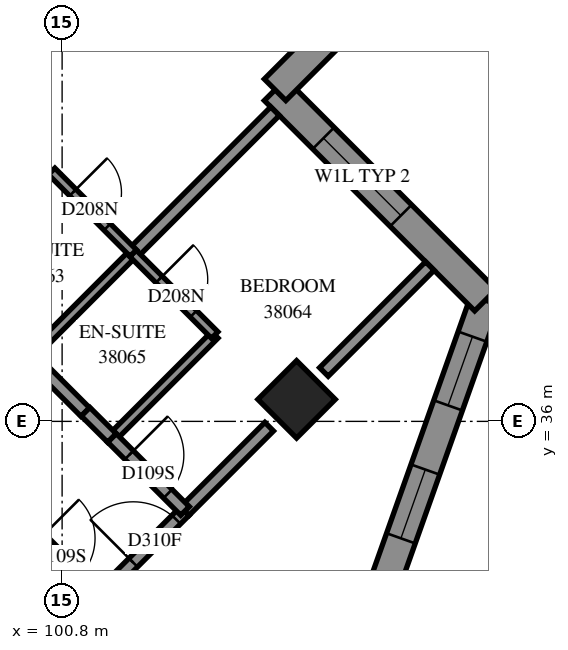
"""IFC4 building model, lengths in metres.
Left out: names, types, materials, properties, quantities, classifications, styles, units other than length and angle.
Written with IfcOpenShell. Run it as: python <this file> out.ifc"""

import sys

from ifc_helpers import new_model, si_unit, direction, frame, frame_2d, origin, origin_2d, place, context, subcontext, project, spatial, polyline, rectangle, outline, extrude, element, fill, save


model = new_model("IFC4")
c1 = context("Model", 3, precision=1e-05, world=origin(), true_north=direction((0.0, 1.0)))
c2 = subcontext(c1, "Body", "Model", "MODEL_VIEW")
j1 = project(units=[si_unit("LENGTHUNIT", "METRE"), si_unit("PLANEANGLEUNIT", "RADIAN")], contexts=[c1])
p1 = place(None, origin())
s1 = spatial("IfcSite", under=j1, at=p1, CompositionType="ELEMENT")
p2 = place(p1, origin())
s2 = spatial("IfcBuilding", under=s1, at=p2, CompositionType="ELEMENT")
p3 = place(p2, frame((0.0, 0.0, 142.2)))
s3 = spatial("IfcBuildingStorey", under=s2, at=p3, CompositionType="ELEMENT", Elevation=142.2)
p4 = place(p3, frame((104.656, 36.362, 0.0), z_axis=(0.0, 0.0, 1.0), x_axis=(0.7071067812, -0.7071067812, 0.0)))
e1 = element("IfcColumn", 1, at=p4, inside=s3, PredefinedType="COLUMN", context=c2, shape_type="SweptSolid", body=[
    extrude(rectangle(XDim=0.9, YDim=0.9, at=origin_2d()), origin(), (0.0, 0.0, 1.0), 3.1),
])
p5 = place(p3, frame((105.986, 32.989, 0.0), z_axis=(0.0, 0.0, 1.0), x_axis=(0.3344271092, 0.9424216194, 0.0)))
e2 = element("IfcWall", 2, at=p5, inside=s3, PredefinedType="SOLIDWALL", context=c2, shape_type="SweptSolid", body=[
    extrude(outline(polyline([(-0.114, -0.25), (5.468, -0.25), (5.153, 0.25), (0.114, 0.25), (-0.114, -0.25)])), origin(), (0.0, 0.0, 1.0), 3.1),
])
p6 = place(p5, frame((1.155, 0.0, 0.45)))
e3 = element("IfcOpeningElement", 3, at=p6, cuts=e2, PredefinedType="OPENING", context=c2, shape_type="SweptSolid", body=[
    extrude(rectangle(XDim=1.2, YDim=2.5, at=frame_2d((0.6, 1.25))), frame((0.0, 0.26, 0.0), z_axis=(0.0, -1.0, 0.0), x_axis=(1.0, 0.0, 0.0)), (0.0, 0.0, 1.0), 0.52),
])
p7 = place(p5, frame((3.474, 0.0, 0.45)))
e4 = element("IfcOpeningElement", 4, at=p7, cuts=e2, PredefinedType="OPENING", context=c2, shape_type="SweptSolid", body=[
    extrude(rectangle(XDim=1.2, YDim=2.5, at=frame_2d((0.6, 1.25))), frame((0.0, 0.26, 0.0), z_axis=(0.0, -1.0, 0.0), x_axis=(1.0, 0.0, 0.0)), (0.0, 0.0, 1.0), 0.52),
])
p8 = place(p3, frame((107.762, 37.994, 0.0), z_axis=(0.0, 0.0, 1.0), x_axis=(-0.7071170013, 0.7070965609, 0.0)))
e5 = element("IfcWall", 5, at=p8, inside=s3, PredefinedType="SOLIDWALL", context=c2, shape_type="SweptSolid", body=[
    extrude(outline(polyline([(-0.158, -0.25), (4.642, -0.25), (5.142, 0.25), (0.158, 0.25), (-0.158, -0.25)])), origin(), (0.0, 0.0, 1.0), 3.1),
])
p9 = place(p8, frame((1.967, 0.0, 0.6)))
e6 = element("IfcOpeningElement", 6, at=p9, cuts=e5, PredefinedType="OPENING", context=c2, shape_type="SweptSolid", body=[
    extrude(rectangle(XDim=1.8, YDim=1.9, at=frame_2d((0.9, 0.95))), frame((0.0, 0.26, 0.0), z_axis=(0.0, -1.0, 0.0), x_axis=(1.0, 0.0, 0.0)), (0.0, 0.0, 1.0), 0.52),
])
p10 = place(p3, frame((104.302, 41.453, 0.0), z_axis=(0.0, 0.0, 1.0), x_axis=(0.707115584, 0.7070979783, 0.0)))
e7 = element("IfcWall", 7, at=p10, inside=s3, PredefinedType="SOLIDWALL", context=c2, shape_type="SweptSolid", body=[
    extrude(outline(polyline([(0.25, -0.25), (6.011, -0.25), (5.349, 0.25), (-0.25, 0.25), (0.25, -0.25)])), origin(), (0.0, 0.0, 1.0), 3.1),
])
p11 = place(p10, frame((1.125, 0.0, 0.6)))
e8 = element("IfcOpeningElement", 8, at=p11, cuts=e7, PredefinedType="OPENING", context=c2, shape_type="SweptSolid", body=[
    extrude(rectangle(XDim=1.8, YDim=1.9, at=frame_2d((0.9, 0.95))), frame((0.0, 0.26, 0.0), z_axis=(0.0, -1.0, 0.0), x_axis=(1.0, 0.0, 0.0)), (0.0, 0.0, 1.0), 0.52),
])
p12 = place(p3, frame((95.177, 42.157, 0.0), z_axis=(0.0, 0.0, 1.0), x_axis=(0.7071067812, -0.7071067812, 0.0)))
e9 = element("IfcWall", 9, at=p12, inside=s3, PredefinedType="PARTITIONING", context=c2, shape_type="SweptSolid", body=[
    extrude(rectangle(XDim=8.491, YDim=0.2, at=frame_2d((4.245, 0.0))), origin(), (0.0, 0.0, 1.0), 3.1),
])
p13 = place(p12, frame((2.3, 0.0, 0.0)))
e10 = element("IfcOpeningElement", 10, at=p13, cuts=e9, PredefinedType="OPENING", context=c2, shape_type="SweptSolid", body=[
    extrude(rectangle(XDim=0.9, YDim=2.1, at=frame_2d((0.45, 1.05))), frame((0.0, 0.11, 0.0), z_axis=(0.0, -1.0, 0.0), x_axis=(1.0, 0.0, 0.0)), (0.0, 0.0, 1.0), 0.22),
])
p14 = place(p12, frame((3.95, 0.0, 0.0)))
e11 = element("IfcOpeningElement", 11, at=p14, cuts=e9, PredefinedType="OPENING", context=c2, shape_type="SweptSolid", body=[
    extrude(rectangle(XDim=0.9, YDim=2.1, at=frame_2d((0.45, 1.05))), frame((0.0, 0.11, 0.0), z_axis=(0.0, -1.0, 0.0), x_axis=(1.0, 0.0, 0.0)), (0.0, 0.0, 1.0), 0.22),
])
p15 = place(p3, frame((100.013, 41.903, 0.0), z_axis=(0.0, 0.0, 1.0), x_axis=(0.7071067812, 0.7071067812, 0.0)))
e12 = element("IfcWall", 12, at=p15, inside=s3, PredefinedType="PARTITIONING", context=c2, shape_type="SweptSolid", body=[
    extrude(rectangle(XDim=5.928, YDim=0.2, at=frame_2d((2.964, 0.0))), origin(), (0.0, 0.0, 1.0), 3.1),
])
p16 = place(p3, frame((101.968, 38.766, 0.0), z_axis=(0.0, 0.0, 1.0), x_axis=(0.7071067812, 0.7071067812, 0.0)))
e13 = element("IfcWall", 13, at=p16, inside=s3, PredefinedType="PARTITIONING", context=c2, shape_type="SweptSolid", body=[
    extrude(rectangle(XDim=3.3, YDim=0.2, at=frame_2d((1.65, 0.0))), origin(), (0.0, 0.0, 1.0), 3.1),
])
p17 = place(p3, frame((105.105, 36.813, 0.0), z_axis=(0.0, 0.0, 1.0), x_axis=(0.7071067812, 0.7071067812, 0.0)))
e14 = element("IfcWall", 14, at=p17, inside=s3, PredefinedType="PARTITIONING", context=c2, shape_type="SweptSolid", body=[
    extrude(rectangle(XDim=2.463, YDim=0.2, at=frame_2d((1.232, 0.0))), origin(), (0.0, 0.0, 1.0), 3.1),
])
p18 = place(p3, frame((98.927, 38.413, 0.0), z_axis=(0.0, 0.0, 1.0), x_axis=(0.7071067812, 0.7071067812, 0.0)))
e15 = element("IfcWall", 15, at=p18, inside=s3, PredefinedType="PARTITIONING", context=c2, shape_type="SweptSolid", body=[
    extrude(rectangle(XDim=2.401, YDim=0.15, at=frame_2d((1.201, 0.0))), origin(), (0.0, 0.0, 1.0), 3.1),
])
p19 = place(p3, frame((100.273, 37.067, 0.0), z_axis=(0.0, 0.0, 1.0), x_axis=(0.706689978, 0.7075233388, 0.0)))
e16 = element("IfcWall", 16, at=p19, inside=s3, PredefinedType="PARTITIONING", context=c2, shape_type="SweptSolid", body=[
    extrude(rectangle(XDim=2.4, YDim=0.15, at=frame_2d((1.2, 0.0))), origin(), (0.0, 0.0, 1.0), 3.1),
])
p20 = place(p3, frame((101.615, 35.727, 0.0), z_axis=(0.0, 0.0, 1.0), x_axis=(0.7071067812, 0.7071067812, 0.0)))
e17 = element("IfcWall", 17, at=p20, inside=s3, PredefinedType="PARTITIONING", context=c2, shape_type="SweptSolid", body=[
    extrude(rectangle(XDim=2.398, YDim=0.15, at=frame_2d((1.199, 0.0))), origin(), (0.0, 0.0, 1.0), 3.1),
])
p21 = place(p3, frame((101.403, 33.111, 0.0), z_axis=(0.0, 0.0, 1.0), x_axis=(0.7071067812, 0.7071067812, 0.0)))
e18 = element("IfcWall", 18, at=p21, inside=s3, PredefinedType="PARTITIONING", context=c2, shape_type="SweptSolid", body=[
    extrude(rectangle(XDim=2.0, YDim=0.2, at=frame_2d((1.0, 0.0))), origin(), (0.0, 0.0, 1.0), 2.6),
])
p22 = place(p21, frame((0.802, 0.0, 0.0)))
e19 = element("IfcOpeningElement", 19, at=p22, cuts=e18, PredefinedType="OPENING", context=c2, shape_type="SweptSolid", body=[
    extrude(rectangle(XDim=1.0, YDim=2.1, at=frame_2d((0.5, 1.05))), frame((0.0, 0.11, 0.0), z_axis=(0.0, -1.0, 0.0), x_axis=(1.0, 0.0, 0.0)), (0.0, 0.0, 1.0), 0.22),
])
p23 = place(p3, frame((102.817, 34.525, 0.0), z_axis=(0.0, 0.0, 1.0), x_axis=(0.7071067812, 0.7071067812, 0.0)))
e20 = element("IfcWall", 20, at=p23, inside=s3, PredefinedType="PARTITIONING", context=c2, shape_type="SweptSolid", body=[
    extrude(rectangle(XDim=1.963, YDim=0.2, at=frame_2d((0.982, 0.0))), origin(), (0.0, 0.0, 1.0), 2.6),
])
p24 = place(p3, frame((101.965, 38.763, 0.0), z_axis=(0.0, 0.0, 1.0), x_axis=(0.7071067812, -0.7071067812, 0.0)))
e21 = element("IfcWall", 21, at=p24, inside=s3, PredefinedType="PARTITIONING", context=c2, shape_type="SweptSolid", body=[
    extrude(rectangle(XDim=1.901, YDim=0.15, at=frame_2d((0.95, 0.0))), origin(), (0.0, 0.0, 1.0), 3.1),
])
p25 = place(p24, frame((0.608, 0.0, 0.0)))
e22 = element("IfcOpeningElement", 22, at=p25, cuts=e21, PredefinedType="OPENING", context=c2, shape_type="SweptSolid", body=[
    extrude(rectangle(XDim=0.8, YDim=2.1, at=frame_2d((0.4, 1.05))), frame((0.0, 0.085, 0.0), z_axis=(0.0, -1.0, 0.0), x_axis=(1.0, 0.0, 0.0)), (0.0, 0.0, 1.0), 0.17),
])
p26 = place(p3, frame((100.628, 40.112, 0.0), z_axis=(0.0, 0.0, 1.0), x_axis=(0.7065800724, -0.7076330979, 0.0)))
e23 = element("IfcWall", 23, at=p26, inside=s3, PredefinedType="PARTITIONING", context=c2, shape_type="SweptSolid", body=[
    extrude(rectangle(XDim=1.899, YDim=0.15, at=frame_2d((0.95, 0.0))), origin(), (0.0, 0.0, 1.0), 3.1),
])
p27 = place(p26, frame((0.493, 0.0, 0.0)))
e24 = element("IfcOpeningElement", 24, at=p27, cuts=e23, PredefinedType="OPENING", context=c2, shape_type="SweptSolid", body=[
    extrude(rectangle(XDim=0.8, YDim=2.1, at=frame_2d((0.4, 1.05))), frame((0.0, 0.085, 0.0), z_axis=(0.0, -1.0, 0.0), x_axis=(1.0, 0.0, 0.0)), (0.0, 0.0, 1.0), 0.17),
])
p28 = place(p3, frame((100.205, 34.315, 0.0), z_axis=(0.0, 0.0, 1.0), x_axis=(0.7071067812, -0.7071067812, 0.0)))
e25 = element("IfcWall", 25, at=p28, inside=s3, PredefinedType="PARTITIONING", context=c2, shape_type="SweptSolid", body=[
    extrude(rectangle(XDim=1.7, YDim=0.2, at=frame_2d((0.85, 0.0))), origin(), (0.0, 0.0, 1.0), 3.1),
])
p29 = place(p28, frame((0.335, 0.0, 0.0)))
e26 = element("IfcOpeningElement", 26, at=p29, cuts=e25, PredefinedType="OPENING", context=c2, shape_type="SweptSolid", body=[
    extrude(rectangle(XDim=0.9, YDim=2.1, at=frame_2d((0.45, 1.05))), frame((0.0, 0.11, 0.0), z_axis=(0.0, -1.0, 0.0), x_axis=(1.0, 0.0, 0.0)), (0.0, 0.0, 1.0), 0.22),
])
p30 = place(p3, frame((101.619, 35.729, 0.0), z_axis=(0.0, 0.0, 1.0), x_axis=(0.7071067812, -0.7071067812, 0.0)))
e27 = element("IfcWall", 27, at=p30, inside=s3, PredefinedType="PARTITIONING", context=c2, shape_type="SweptSolid", body=[
    extrude(rectangle(XDim=1.7, YDim=0.2, at=frame_2d((0.85, 0.0))), origin(), (0.0, 0.0, 1.0), 3.1),
])
p31 = place(p30, frame((0.4, 0.0, 0.0)))
e28 = element("IfcOpeningElement", 28, at=p31, cuts=e27, PredefinedType="OPENING", context=c2, shape_type="SweptSolid", body=[
    extrude(rectangle(XDim=0.9, YDim=2.1, at=frame_2d((0.45, 1.05))), frame((0.0, 0.11, 0.0), z_axis=(0.0, -1.0, 0.0), x_axis=(1.0, 0.0, 0.0)), (0.0, 0.0, 1.0), 0.22),
])
p32 = place(p3, frame((101.186, 36.158, 0.0), z_axis=(0.0, 0.0, 1.0), x_axis=(0.7087454925, -0.7054642634, 0.0)))
e29 = element("IfcWall", 29, at=p32, inside=s3, PredefinedType="PARTITIONING", context=c2, shape_type="SweptSolid", body=[
    extrude(rectangle(XDim=0.61, YDim=0.2, at=frame_2d((0.305, 0.0))), origin(), (0.0, 0.0, 1.0), 3.1),
])
p33 = place(p6, origin())
e30 = element("IfcWindow", 30, at=p33, inside=s3, PartitioningType="SINGLE_PANEL", PredefinedType="WINDOW", context=c2, shape_type="SweptSolid", body=[
    extrude(rectangle(XDim=1.2, YDim=2.5, at=frame_2d((0.6, 1.25))), frame((0.0, 0.18, 0.0), z_axis=(0.0, -1.0, 0.0), x_axis=(1.0, 0.0, 0.0)), (0.0, 0.0, 1.0), 0.06),
])
fill(e3, e30)
p34 = place(p7, origin())
e31 = element("IfcWindow", 31, at=p34, inside=s3, PartitioningType="SINGLE_PANEL", PredefinedType="WINDOW", context=c2, shape_type="SweptSolid", body=[
    extrude(rectangle(XDim=1.2, YDim=2.5, at=frame_2d((0.6, 1.25))), frame((0.0, 0.18, 0.0), z_axis=(0.0, -1.0, 0.0), x_axis=(1.0, 0.0, 0.0)), (0.0, 0.0, 1.0), 0.06),
])
fill(e4, e31)
p35 = place(p9, origin())
e32 = element("IfcWindow", 32, at=p35, inside=s3, PartitioningType="SINGLE_PANEL", PredefinedType="WINDOW", context=c2, shape_type="SweptSolid", body=[
    extrude(rectangle(XDim=1.8, YDim=1.9, at=frame_2d((0.9, 0.95))), frame((0.0, 0.18, 0.0), z_axis=(0.0, -1.0, 0.0), x_axis=(1.0, 0.0, 0.0)), (0.0, 0.0, 1.0), 0.06),
])
fill(e6, e32)
p36 = place(p27, origin())
e33 = element("IfcDoor", 33, at=p36, inside=s3, OperationType="SINGLE_SWING_RIGHT", PredefinedType="DOOR", context=c2, shape_type="SweptSolid", body=[
    extrude(rectangle(XDim=0.8, YDim=2.1, at=frame_2d((0.4, 1.05))), frame((0.0, 0.025, 0.0), z_axis=(0.0, -1.0, 0.0), x_axis=(1.0, 0.0, 0.0)), (0.0, 0.0, 1.0), 0.05),
])
fill(e24, e33)
p37 = place(p31, origin())
e34 = element("IfcDoor", 34, at=p37, inside=s3, OperationType="SINGLE_SWING_RIGHT", PredefinedType="DOOR", context=c2, shape_type="SweptSolid", body=[
    extrude(rectangle(XDim=0.9, YDim=2.1, at=frame_2d((0.45, 1.05))), frame((0.0, 0.025, 0.0), z_axis=(0.0, -1.0, 0.0), x_axis=(1.0, 0.0, 0.0)), (0.0, 0.0, 1.0), 0.05),
])
fill(e28, e34)
p38 = place(p25, origin())
e35 = element("IfcDoor", 35, at=p38, inside=s3, OperationType="SINGLE_SWING_RIGHT", PredefinedType="DOOR", context=c2, shape_type="SweptSolid", body=[
    extrude(rectangle(XDim=0.8, YDim=2.1, at=frame_2d((0.4, 1.05))), frame((0.0, 0.025, 0.0), z_axis=(0.0, -1.0, 0.0), x_axis=(1.0, 0.0, 0.0)), (0.0, 0.0, 1.0), 0.05),
])
fill(e22, e35)
p39 = place(p29, origin())
e36 = element("IfcDoor", 36, at=p39, inside=s3, OperationType="SINGLE_SWING_LEFT", PredefinedType="DOOR", context=c2, shape_type="SweptSolid", body=[
    extrude(rectangle(XDim=0.9, YDim=2.1, at=frame_2d((0.45, 1.05))), frame((0.0, 0.025, 0.0), z_axis=(0.0, -1.0, 0.0), x_axis=(1.0, 0.0, 0.0)), (0.0, 0.0, 1.0), 0.05),
])
fill(e26, e36)
p40 = place(p22, origin())
e37 = element("IfcDoor", 37, at=p40, inside=s3, OperationType="SINGLE_SWING_RIGHT", PredefinedType="DOOR", context=c2, shape_type="SweptSolid", body=[
    extrude(rectangle(XDim=1.0, YDim=2.1, at=frame_2d((0.5, 1.05))), frame((0.0, 0.025, 0.0), z_axis=(0.0, -1.0, 0.0), x_axis=(1.0, 0.0, 0.0)), (0.0, 0.0, 1.0), 0.05),
])
fill(e19, e37)
save(model, sys.argv[1])
